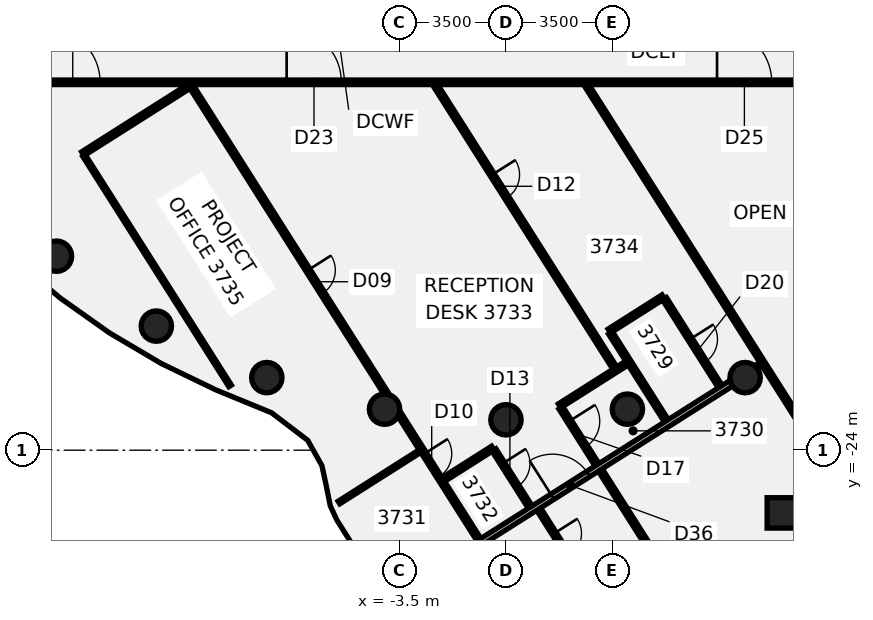
"""IFC4 building model, lengths in metres.
Left out: names, types, materials, properties, quantities, classifications, styles, units other than length and angle.
Written with IfcOpenShell. Run it as: python <this file> out.ifc"""

import sys

from ifc_helpers import new_model, si_unit, direction, frame, frame_2d, origin, origin_2d, place, context, subcontext, project, spatial, rectangle, circle, extrude, element, fill, save


model = new_model("IFC4")
c1 = context("Model", 3, precision=1e-05, world=origin(), true_north=direction((0.0, 1.0)))
c2 = subcontext(c1, "Body", "Model", "MODEL_VIEW")
j1 = project(units=[si_unit("LENGTHUNIT", "METRE"), si_unit("PLANEANGLEUNIT", "RADIAN")], contexts=[c1])
p1 = place(None, origin())
s1 = spatial("IfcSite", under=j1, at=p1, CompositionType="ELEMENT")
p2 = place(p1, origin())
s2 = spatial("IfcBuilding", under=s1, at=p2, CompositionType="ELEMENT")
p3 = place(p2, frame((0.0, 0.0, 151.75)))
s3 = spatial("IfcBuildingStorey", under=s2, at=p3, CompositionType="ELEMENT", Elevation=151.75)
for number, where, z_axis, x_axis in (
    (1, (-14.784, -17.619, -0.14), (0.0, 0.0, 1.0), (1.0, 0.0, 0.0)),
    (2, (-11.5, -19.919, -0.14), (0.0, 0.0, 1.0), (1.0, 0.0, 0.0)),
    (3, (-7.866, -21.613, -0.14), (0.0, 0.0, 1.0), (1.0, 0.0, 0.0)),
    (4, (-3.994, -22.651, -0.14), (0.0, 0.0, 1.0), (1.0, 0.0, 0.0)),
    (5, (0.0, -23.0, -0.14), (0.0, 0.0, 1.0), (1.0, 0.0, 0.0)),
    (6, (3.994, -22.651, -0.14), (0.0, 0.0, 1.0), (1.0, 0.0, 0.0)),
    (7, (7.866, -21.613, -0.14), (0.0, 0.0, 1.0), (1.0, 0.0, 0.0)),
):
    element("IfcColumn", number, at=place(p3, frame(where, z_axis=z_axis, x_axis=x_axis)), inside=s3, PredefinedType="COLUMN", context=c2, shape_type="SweptSolid", body=[
        extrude(circle(Radius=0.5, at=origin_2d()), origin(), (0.0, 0.0, 1.0), 3.75),
    ])
p4 = place(p3, frame((9.09, -26.062, -0.139), z_axis=(0.01932716713, 0.044315827662, 0.998830600267), x_axis=(-0.84409029995, -0.534702759857, 0.04005651173)))
e8 = element("IfcColumn", 8, at=p4, inside=s3, PredefinedType="COLUMN", context=c2, shape_type="SweptSolid", body=[
    extrude(rectangle(XDim=1.0, YDim=1.0, at=origin_2d()), origin(), (0.0, 0.0, 1.0), 3.752),
])
p5 = place(p3, frame((-13.877, -14.312, 0.0), z_axis=(0.0, 0.0, 1.0), x_axis=(0.535664679525, -0.844430785268, 0.0)))
e9 = element("IfcWall", 9, at=p5, inside=s3, PredefinedType="PARTITIONING", context=c2, shape_type="SweptSolid", body=[
    extrude(rectangle(XDim=8.967, YDim=0.1, at=frame_2d((4.484, 0.0))), origin(), (0.0, 0.0, 1.0), 3.01),
])
p6 = place(p3, frame((-10.327, -12.067, 0.0), z_axis=(0.0, 0.0, 1.0), x_axis=(0.535642730436, -0.844444708273, 0.0)))
e10 = element("IfcWall", 10, at=p6, inside=s3, PredefinedType="PARTITIONING", context=c2, shape_type="SweptSolid", body=[
    extrude(rectangle(XDim=12.103, YDim=0.15, at=frame_2d((6.051, 0.0))), origin(), (0.0, 0.0, 1.0), 3.01),
])
p7 = place(p6, frame((7.12, 0.0, 0.0)))
e11 = element("IfcOpeningElement", 11, at=p7, cuts=e10, PredefinedType="OPENING", context=c2, shape_type="SweptSolid", body=[
    extrude(rectangle(XDim=0.9, YDim=2.1, at=frame_2d((0.45, 1.05))), frame((0.0, 0.085, 0.0), z_axis=(0.0, -1.0, 0.0), x_axis=(1.0, 0.0, 0.0)), (0.0, 0.0, 1.0), 0.17),
])
p8 = place(p3, frame((-3.604, -22.667, 0.0), z_axis=(0.0, 0.0, 1.0), x_axis=(0.535643435477, -0.844444261056, 0.0)))
e12 = element("IfcWall", 12, at=p8, inside=s3, PredefinedType="PARTITIONING", context=c2, shape_type="SweptSolid", body=[
    extrude(rectangle(XDim=5.067, YDim=0.15, at=frame_2d((2.533, 0.0))), origin(), (0.0, 0.0, 1.0), 3.01),
])
p9 = place(p8, frame((1.717, 0.0, 0.0)))
e13 = element("IfcOpeningElement", 13, at=p9, cuts=e12, PredefinedType="OPENING", context=c2, shape_type="SweptSolid", body=[
    extrude(rectangle(XDim=0.9, YDim=2.1, at=frame_2d((0.45, 1.05))), frame((0.0, 0.085, 0.0), z_axis=(0.0, -1.0, 0.0), x_axis=(1.0, 0.0, 0.0)), (0.0, 0.0, 1.0), 0.17),
])
p10 = place(p3, frame((-2.319, -11.997, 0.0), z_axis=(0.0, 0.0, 1.0), x_axis=(0.535683974437, -0.844418545232, 0.0)))
e14 = element("IfcWall", 14, at=p10, inside=s3, PredefinedType="PARTITIONING", context=c2, shape_type="SweptSolid", body=[
    extrude(rectangle(XDim=11.009, YDim=0.15, at=frame_2d((5.505, 0.0))), origin(), (0.0, 0.0, 1.0), 3.01),
])
p11 = place(p10, frame((3.485, 0.0, 0.0)))
e15 = element("IfcOpeningElement", 15, at=p11, cuts=e14, PredefinedType="OPENING", context=c2, shape_type="SweptSolid", body=[
    extrude(rectangle(XDim=0.9, YDim=2.1, at=frame_2d((0.45, 1.05))), frame((0.0, 0.085, 0.0), z_axis=(0.0, -1.0, 0.0), x_axis=(1.0, 0.0, 0.0)), (0.0, 0.0, 1.0), 0.17),
])
p12 = place(p3, frame((-0.392, -23.995, 0.0), z_axis=(0.0, 0.0, 1.0), x_axis=(0.535461858409, -0.844559410692, 0.0)))
e16 = element("IfcWall", 16, at=p12, inside=s3, PredefinedType="PARTITIONING", context=c2, shape_type="SweptSolid", body=[
    extrude(rectangle(XDim=2.225, YDim=0.15, at=frame_2d((1.113, 0.0))), origin(), (0.0, 0.0, 1.0), 3.01),
])
p13 = place(p12, frame((0.525, 0.0, 0.0)))
e17 = element("IfcOpeningElement", 17, at=p13, cuts=e16, PredefinedType="OPENING", context=c2, shape_type="SweptSolid", body=[
    extrude(rectangle(XDim=0.9, YDim=2.1, at=frame_2d((0.45, 1.05))), frame((0.0, 0.085, 0.0), z_axis=(0.0, -1.0, 0.0), x_axis=(1.0, 0.0, 0.0)), (0.0, 0.0, 1.0), 0.17),
])
p14 = place(p3, frame((1.076, -25.936, 0.0), z_axis=(0.0, 0.0, 1.0), x_axis=(0.535667461616, -0.844429020443, 0.0)))
e18 = element("IfcWall", 18, at=p14, inside=s3, PredefinedType="PARTITIONING", context=c2, shape_type="SweptSolid", body=[
    extrude(rectangle(XDim=3.859, YDim=0.15, at=frame_2d((1.93, 0.0))), origin(), (0.0, 0.0, 1.0), 3.01),
])
p15 = place(p14, frame((0.95, 0.0, 0.0)))
e19 = element("IfcOpeningElement", 19, at=p15, cuts=e18, PredefinedType="OPENING", context=c2, shape_type="SweptSolid", body=[
    extrude(rectangle(XDim=0.9, YDim=2.1, at=frame_2d((0.45, 1.05))), frame((0.0, 0.085, 0.0), z_axis=(0.0, -1.0, 0.0), x_axis=(1.0, 0.0, 0.0)), (0.0, 0.0, 1.0), 0.17),
])
p16 = place(p3, frame((1.806, -22.607, 0.0), z_axis=(0.0, 0.0, 1.0), x_axis=(0.535719099476, -0.844396261513, 0.0)))
e20 = element("IfcWall", 20, at=p16, inside=s3, PredefinedType="PARTITIONING", context=c2, shape_type="SweptSolid", body=[
    extrude(rectangle(XDim=20.24, YDim=0.15, at=frame_2d((10.12, 0.0))), origin(), (0.0, 0.0, 1.0), 3.01),
])
p17 = place(p16, frame((0.52, 0.0, 0.0)))
e21 = element("IfcOpeningElement", 21, at=p17, cuts=e20, PredefinedType="OPENING", context=c2, shape_type="SweptSolid", body=[
    extrude(rectangle(XDim=1.0, YDim=2.1, at=frame_2d((0.5, 1.05))), frame((0.0, 0.085, 0.0), z_axis=(0.0, -1.0, 0.0), x_axis=(1.0, 0.0, 0.0)), (0.0, 0.0, 1.0), 0.17),
])
p18 = place(p16, frame((10.571, 0.0, 0.0)))
e22 = element("IfcOpeningElement", 22, at=p18, cuts=e20, PredefinedType="OPENING", context=c2, shape_type="SweptSolid", body=[
    extrude(rectangle(XDim=0.9, YDim=2.1, at=frame_2d((0.45, 1.05))), frame((0.0, 0.085, 0.0), z_axis=(0.0, -1.0, 0.0), x_axis=(1.0, 0.0, 0.0)), (0.0, 0.0, 1.0), 0.17),
])
p19 = place(p16, frame((17.021, 0.0, 0.0)))
e23 = element("IfcOpeningElement", 23, at=p19, cuts=e20, PredefinedType="OPENING", context=c2, shape_type="SweptSolid", body=[
    extrude(rectangle(XDim=0.9, YDim=2.1, at=frame_2d((0.45, 1.05))), frame((0.0, 0.085, 0.0), z_axis=(0.0, -1.0, 0.0), x_axis=(1.0, 0.0, 0.0)), (0.0, 0.0, 1.0), 0.17),
])
p20 = place(p3, frame((2.655, -11.997, 0.0), z_axis=(0.0, 0.0, 1.0), x_axis=(0.53566721482, -0.844429176999, 0.0)))
e24 = element("IfcWall", 24, at=p20, inside=s3, PredefinedType="PARTITIONING", context=c2, shape_type="SweptSolid", body=[
    extrude(rectangle(XDim=13.263, YDim=0.15, at=frame_2d((6.632, 0.0))), origin(), (0.0, 0.0, 1.0), 3.01),
])
p21 = place(p3, frame((3.44, -20.143, 0.0), z_axis=(0.0, 0.0, 1.0), x_axis=(0.535892834872, -0.844286011689, 0.0)))
e25 = element("IfcWall", 25, at=p21, inside=s3, PredefinedType="PARTITIONING", context=c2, shape_type="SweptSolid", body=[
    extrude(rectangle(XDim=3.426, YDim=0.15, at=frame_2d((1.713, 0.0))), origin(), (0.0, 0.0, 1.0), 3.01),
])
p22 = place(p3, frame((5.214, -19.018, 0.0), z_axis=(0.0, 0.0, 1.0), x_axis=(0.535555665094, -0.844499928707, 0.0)))
e26 = element("IfcWall", 26, at=p22, inside=s3, PredefinedType="PARTITIONING", context=c2, shape_type="SweptSolid", body=[
    extrude(rectangle(XDim=3.425, YDim=0.15, at=frame_2d((1.712, 0.0))), origin(), (0.0, 0.0, 1.0), 3.01),
])
p23 = place(p22, frame((1.575, 0.0, 0.0)))
e27 = element("IfcOpeningElement", 27, at=p23, cuts=e26, PredefinedType="OPENING", context=c2, shape_type="SweptSolid", body=[
    extrude(rectangle(XDim=0.9, YDim=2.1, at=frame_2d((0.45, 1.05))), frame((0.0, 0.085, 0.0), z_axis=(0.0, -1.0, 0.0), x_axis=(1.0, 0.0, 0.0)), (0.0, 0.0, 1.0), 0.17),
])
p24 = place(p3, frame((-17.1, -11.9, 0.0), z_axis=(0.0, 0.0, 1.0), x_axis=(1.0, 0.0, 0.0)))
e28 = element("IfcWall", 28, at=p24, inside=s3, PredefinedType="PARTITIONING", context=c2, shape_type="SweptSolid", body=[
    extrude(rectangle(XDim=34.165, YDim=0.15, at=frame_2d((17.083, 0.0))), origin(), (0.0, 0.0, 1.0), 3.01),
])
p25 = place(p24, frame((9.886, 0.0, 0.0)))
e29 = element("IfcOpeningElement", 29, at=p25, cuts=e28, PredefinedType="OPENING", context=c2, shape_type="SweptSolid", body=[
    extrude(rectangle(XDim=1.8, YDim=2.1, at=frame_2d((0.9, 1.05))), frame((0.0, 0.085, 0.0), z_axis=(0.0, -1.0, 0.0), x_axis=(1.0, 0.0, 0.0)), (0.0, 0.0, 1.0), 0.17),
])
p26 = place(p24, frame((1.95, 0.0, 0.0)))
e30 = element("IfcOpeningElement", 30, at=p26, cuts=e28, PredefinedType="OPENING", context=c2, shape_type="SweptSolid", body=[
    extrude(rectangle(XDim=1.8, YDim=2.1, at=frame_2d((0.9, 1.05))), frame((0.0, 0.085, 0.0), z_axis=(0.0, -1.0, 0.0), x_axis=(1.0, 0.0, 0.0)), (0.0, 0.0, 1.0), 0.17),
])
p27 = place(p24, frame((24.043, 0.0, 0.0)))
e31 = element("IfcOpeningElement", 31, at=p27, cuts=e28, PredefinedType="OPENING", context=c2, shape_type="SweptSolid", body=[
    extrude(rectangle(XDim=1.8, YDim=2.1, at=frame_2d((0.9, 1.05))), frame((0.0, 0.085, 0.0), z_axis=(0.0, -1.0, 0.0), x_axis=(1.0, 0.0, 0.0)), (0.0, 0.0, 1.0), 0.17),
])
p28 = place(p3, frame((-13.917, -14.249, 0.0), z_axis=(0.0, 0.0, 1.0), x_axis=(0.844421821782, 0.535678809454, 0.0)))
e32 = element("IfcWall", 32, at=p28, inside=s3, PredefinedType="PARTITIONING", context=c2, shape_type="SweptSolid", body=[
    extrude(rectangle(XDim=4.16, YDim=0.15, at=frame_2d((2.08, 0.0))), origin(), (0.0, 0.0, 1.0), 3.01),
])
p29 = place(p3, frame((-5.493, -25.722, 0.0), z_axis=(0.0, 0.0, 1.0), x_axis=(0.844399379413, 0.535714185034, 0.0)))
e33 = element("IfcWall", 33, at=p29, inside=s3, PredefinedType="PARTITIONING", context=c2, shape_type="SweptSolid", body=[
    extrude(rectangle(XDim=3.157, YDim=0.1, at=frame_2d((1.579, 0.0))), origin(), (0.0, 0.0, 1.0), 3.01),
])
p30 = place(p3, frame((3.4, -20.08, 0.0), z_axis=(0.0, 0.0, 1.0), x_axis=(0.844388056722, 0.535732031584, 0.0)))
e34 = element("IfcWall", 34, at=p30, inside=s3, PredefinedType="PARTITIONING", context=c2, shape_type="SweptSolid", body=[
    extrude(rectangle(XDim=2.101, YDim=0.15, at=frame_2d((1.05, 0.0))), origin(), (0.0, 0.0, 1.0), 3.01),
])
p31 = place(p3, frame((-3.621, -28.798, 0.0), z_axis=(0.0, 0.0, 1.0), x_axis=(0.844419013284, 0.535683236627, 0.0)))
e35 = element("IfcWall", 35, at=p31, inside=s3, PredefinedType="PARTITIONING", context=c2, shape_type="SweptSolid", body=[
    extrude(rectangle(XDim=13.322, YDim=0.2, at=frame_2d((6.661, 0.0))), origin(), (0.0, 0.0, 1.0), 3.01),
])
p32 = place(p31, frame((6.099, 0.0, 0.0)))
e36 = element("IfcOpeningElement", 36, at=p32, cuts=e35, PredefinedType="OPENING", context=c2, shape_type="SweptSolid", body=[
    extrude(rectangle(XDim=1.4, YDim=2.1, at=frame_2d((0.7, 1.05))), frame((0.0, 0.11, 0.0), z_axis=(0.0, -1.0, 0.0), x_axis=(1.0, 0.0, 0.0)), (0.0, 0.0, 1.0), 0.22),
])
p33 = place(p3, frame((8.008, -21.42, 0.0), z_axis=(0.0, 0.0, 1.0), x_axis=(0.844395258973, 0.535720679668, 0.0)))
e37 = element("IfcWall", 37, at=p33, inside=s3, PredefinedType="PARTITIONING", context=c2, shape_type="SweptSolid", body=[
    extrude(rectangle(XDim=0.452, YDim=0.15, at=frame_2d((0.226, 0.0))), origin(), (0.0, 0.0, 1.0), 3.01),
])
p34 = place(p3, frame((-2.053, -24.96, 0.0), z_axis=(0.0, 0.0, 1.0), x_axis=(0.84450857845, 0.535542025358, 0.0)))
e38 = element("IfcWall", 38, at=p34, inside=s3, PredefinedType="PARTITIONING", context=c2, shape_type="SweptSolid", body=[
    extrude(rectangle(XDim=1.92, YDim=0.15, at=frame_2d((0.96, 0.0))), origin(), (0.0, 0.0, 1.0), 3.01),
])
p35 = place(p3, frame((1.763, -22.54, 0.0), z_axis=(0.0, 0.0, 1.0), x_axis=(0.844519885182, 0.535524195095, 0.0)))
e39 = element("IfcWall", 39, at=p35, inside=s3, PredefinedType="PARTITIONING", context=c2, shape_type="SweptSolid", body=[
    extrude(rectangle(XDim=2.62, YDim=0.15, at=frame_2d((1.31, 0.0))), origin(), (0.0, 0.0, 1.0), 3.01),
])
p36 = place(p7, frame((0.9, 0.0, 0.0), z_axis=(0.0, 0.0, 1.0), x_axis=(-1.0, 0.0, 0.0)))
e40 = element("IfcDoor", 40, at=p36, inside=s3, OperationType="SINGLE_SWING_RIGHT", PredefinedType="DOOR", context=c2, shape_type="SweptSolid", body=[
    extrude(rectangle(XDim=0.9, YDim=2.1, at=frame_2d((0.45, 1.05))), frame((0.0, 0.025, 0.0), z_axis=(0.0, -1.0, 0.0), x_axis=(1.0, 0.0, 0.0)), (0.0, 0.0, 1.0), 0.05),
])
fill(e11, e40)
p37 = place(p9, frame((0.9, 0.0, 0.0), z_axis=(0.0, 0.0, 1.0), x_axis=(-1.0, 0.0, 0.0)))
e41 = element("IfcDoor", 41, at=p37, inside=s3, OperationType="SINGLE_SWING_LEFT", PredefinedType="DOOR", context=c2, shape_type="SweptSolid", body=[
    extrude(rectangle(XDim=0.9, YDim=2.1, at=frame_2d((0.45, 1.05))), frame((0.0, 0.025, 0.0), z_axis=(0.0, -1.0, 0.0), x_axis=(1.0, 0.0, 0.0)), (0.0, 0.0, 1.0), 0.05),
])
fill(e13, e41)
p38 = place(p11, origin())
e42 = element("IfcDoor", 42, at=p38, inside=s3, OperationType="SINGLE_SWING_RIGHT", PredefinedType="DOOR", context=c2, shape_type="SweptSolid", body=[
    extrude(rectangle(XDim=0.9, YDim=2.1, at=frame_2d((0.45, 1.05))), frame((0.0, 0.025, 0.0), z_axis=(0.0, -1.0, 0.0), x_axis=(1.0, 0.0, 0.0)), (0.0, 0.0, 1.0), 0.05),
])
fill(e15, e42)
p39 = place(p13, frame((0.9, 0.0, 0.0), z_axis=(0.0, 0.0, 1.0), x_axis=(-1.0, 0.0, 0.0)))
e43 = element("IfcDoor", 43, at=p39, inside=s3, OperationType="SINGLE_SWING_LEFT", PredefinedType="DOOR", context=c2, shape_type="SweptSolid", body=[
    extrude(rectangle(XDim=0.9, YDim=2.1, at=frame_2d((0.45, 1.05))), frame((0.0, 0.025, 0.0), z_axis=(0.0, -1.0, 0.0), x_axis=(1.0, 0.0, 0.0)), (0.0, 0.0, 1.0), 0.05),
])
fill(e17, e43)
p40 = place(p15, frame((0.9, 0.0, 0.0), z_axis=(0.0, 0.0, 1.0), x_axis=(-1.0, 0.0, 0.0)))
e44 = element("IfcDoor", 44, at=p40, inside=s3, OperationType="SINGLE_SWING_LEFT", PredefinedType="DOOR", context=c2, shape_type="SweptSolid", body=[
    extrude(rectangle(XDim=0.9, YDim=2.1, at=frame_2d((0.45, 1.05))), frame((0.0, 0.025, 0.0), z_axis=(0.0, -1.0, 0.0), x_axis=(1.0, 0.0, 0.0)), (0.0, 0.0, 1.0), 0.05),
])
fill(e19, e44)
p41 = place(p17, origin())
e45 = element("IfcDoor", 45, at=p41, inside=s3, OperationType="SINGLE_SWING_RIGHT", PredefinedType="DOOR", context=c2, shape_type="SweptSolid", body=[
    extrude(rectangle(XDim=1.0, YDim=2.1, at=frame_2d((0.5, 1.05))), frame((0.0, 0.025, 0.0), z_axis=(0.0, -1.0, 0.0), x_axis=(1.0, 0.0, 0.0)), (0.0, 0.0, 1.0), 0.05),
])
fill(e21, e45)
p42 = place(p23, frame((0.9, 0.0, 0.0), z_axis=(0.0, 0.0, 1.0), x_axis=(-1.0, 0.0, 0.0)))
e46 = element("IfcDoor", 46, at=p42, inside=s3, OperationType="SINGLE_SWING_RIGHT", PredefinedType="DOOR", context=c2, shape_type="SweptSolid", body=[
    extrude(rectangle(XDim=0.9, YDim=2.1, at=frame_2d((0.45, 1.05))), frame((0.0, 0.025, 0.0), z_axis=(0.0, -1.0, 0.0), x_axis=(1.0, 0.0, 0.0)), (0.0, 0.0, 1.0), 0.05),
])
fill(e27, e46)
p43 = place(p25, origin())
e47 = element("IfcDoor", 47, at=p43, inside=s3, OperationType="DOUBLE_DOOR_SINGLE_SWING", PredefinedType="DOOR", context=c2, shape_type="SweptSolid", body=[
    extrude(rectangle(XDim=1.8, YDim=2.1, at=frame_2d((0.9, 1.05))), frame((0.0, 0.025, 0.0), z_axis=(0.0, -1.0, 0.0), x_axis=(1.0, 0.0, 0.0)), (0.0, 0.0, 1.0), 0.05),
])
fill(e29, e47)
p44 = place(p26, frame((1.8, 0.0, 0.0), z_axis=(0.0, 0.0, 1.0), x_axis=(-1.0, 0.0, 0.0)))
e48 = element("IfcDoor", 48, at=p44, inside=s3, OperationType="DOUBLE_DOOR_SINGLE_SWING", PredefinedType="DOOR", context=c2, shape_type="SweptSolid", body=[
    extrude(rectangle(XDim=1.8, YDim=2.1, at=frame_2d((0.9, 1.05))), frame((0.0, 0.025, 0.0), z_axis=(0.0, -1.0, 0.0), x_axis=(1.0, 0.0, 0.0)), (0.0, 0.0, 1.0), 0.05),
])
fill(e30, e48)
p45 = place(p27, frame((1.8, 0.0, 0.0), z_axis=(0.0, 0.0, 1.0), x_axis=(-1.0, 0.0, 0.0)))
e49 = element("IfcDoor", 49, at=p45, inside=s3, OperationType="DOUBLE_DOOR_SINGLE_SWING", PredefinedType="DOOR", context=c2, shape_type="SweptSolid", body=[
    extrude(rectangle(XDim=1.8, YDim=2.1, at=frame_2d((0.9, 1.05))), frame((0.0, 0.025, 0.0), z_axis=(0.0, -1.0, 0.0), x_axis=(1.0, 0.0, 0.0)), (0.0, 0.0, 1.0), 0.05),
])
fill(e31, e49)
p46 = place(p32, origin())
e50 = element("IfcDoor", 50, at=p46, inside=s3, OperationType="DOUBLE_DOOR_SINGLE_SWING", PredefinedType="DOOR", context=c2, shape_type="SweptSolid", body=[
    extrude(rectangle(XDim=1.4, YDim=2.1, at=frame_2d((0.7, 1.05))), frame((0.0, 0.025, 0.0), z_axis=(0.0, -1.0, 0.0), x_axis=(1.0, 0.0, 0.0)), (0.0, 0.0, 1.0), 0.05),
])
fill(e36, e50)
save(model, sys.argv[1])
